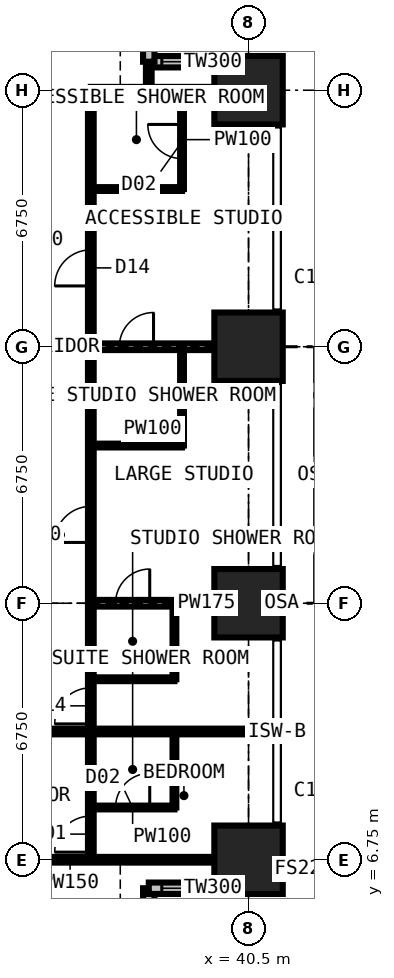
"""IFC4 building model, lengths in metres.
Left out: names, types, materials, properties, quantities, classifications, styles, units other than length and angle.
Written with IfcOpenShell. Run it as: python <this file> out.ifc"""

import sys

from ifc_helpers import new_model, si_unit, direction, frame, frame_2d, origin, origin_2d, place, context, subcontext, project, spatial, rectangle, extrude, element, fill, save


model = new_model("IFC4")
c1 = context("Model", 3, precision=1e-05, world=origin(), true_north=direction((0.0, 1.0)))
c2 = subcontext(c1, "Body", "Model", "MODEL_VIEW")
j1 = project(units=[si_unit("LENGTHUNIT", "METRE"), si_unit("PLANEANGLEUNIT", "RADIAN")], contexts=[c1])
p1 = place(None, origin())
s1 = spatial("IfcSite", under=j1, at=p1, CompositionType="ELEMENT")
p2 = place(p1, origin())
s2 = spatial("IfcBuilding", under=s1, at=p2, CompositionType="ELEMENT")
p3 = place(p2, frame((0.0, 0.0, 90.9)))
s3 = spatial("IfcBuildingStorey", under=s2, at=p3, CompositionType="ELEMENT", Elevation=90.9)
for number, where, z_axis, x_axis in (
    (1, (40.5, 6.75, 0.0), (0.0, 0.0, 1.0), (1.0, 0.0, 0.0)),
    (2, (40.5, 13.5, 0.0), (0.0, 0.0, 1.0), (1.0, 0.0, 0.0)),
    (3, (40.5, 20.25, 0.0), (0.0, 0.0, 1.0), (1.0, 0.0, 0.0)),
    (4, (40.5, 27.0, 0.0), (0.0, 0.0, 1.0), (1.0, 0.0, 0.0)),
):
    element("IfcColumn", number, at=place(p3, frame(where, z_axis=z_axis, x_axis=x_axis)), inside=s3, PredefinedType="COLUMN", context=c2, shape_type="SweptSolid", body=[
        extrude(rectangle(XDim=1.8, YDim=1.8, at=origin_2d()), origin(), (0.0, 0.0, 1.0), 3.6),
    ])
p4 = place(p3, frame((41.25, 27.75, 0.0), z_axis=(0.0, 0.0, 1.0), x_axis=(-1.0, 0.0, 0.0)))
e5 = element("IfcWall", 5, at=p4, inside=s3, PredefinedType="SOLIDWALL", context=c2, shape_type="SweptSolid", body=[
    extrude(rectangle(XDim=3.375, YDim=0.3, at=frame_2d((1.688, 0.0))), origin(), (0.0, 0.0, 1.0), 3.375),
])
p5 = place(p4, frame((1.833, 0.0, 0.9)))
e6 = element("IfcOpeningElement", 6, at=p5, cuts=e5, PredefinedType="OPENING", context=c2, shape_type="SweptSolid", body=[
    extrude(rectangle(XDim=1.2, YDim=1.8, at=frame_2d((0.6, 0.9))), frame((0.0, 0.16, 0.0), z_axis=(0.0, -1.0, 0.0), x_axis=(1.0, 0.0, 0.0)), (0.0, 0.0, 1.0), 0.32),
])
p6 = place(p3, frame((37.875, 27.75, 0.0), z_axis=(0.0, 0.0, 1.0), x_axis=(0.0, 1.0, 0.0)))
e7 = element("IfcWall", 7, at=p6, inside=s3, PredefinedType="SOLIDWALL", context=c2, shape_type="SweptSolid", body=[
    extrude(rectangle(XDim=3.375, YDim=0.3, at=frame_2d((1.688, 0.0))), origin(), (0.0, 0.0, 1.0), 3.375),
])
p7 = place(p6, frame((0.788, 0.0, 0.6)))
e8 = element("IfcOpeningElement", 8, at=p7, cuts=e7, PredefinedType="OPENING", context=c2, shape_type="SweptSolid", body=[
    extrude(rectangle(XDim=1.8, YDim=2.1, at=frame_2d((0.9, 1.05))), frame((0.0, 0.16, 0.0), z_axis=(0.0, -1.0, 0.0), x_axis=(1.0, 0.0, 0.0)), (0.0, 0.0, 1.0), 0.32),
])
p8 = place(p3, frame((37.875, 2.625, 0.0), z_axis=(0.0, 0.0, 1.0), x_axis=(0.0, 1.0, 0.0)))
e9 = element("IfcWall", 9, at=p8, inside=s3, PredefinedType="SOLIDWALL", context=c2, shape_type="SweptSolid", body=[
    extrude(rectangle(XDim=3.375, YDim=0.3, at=frame_2d((1.688, 0.0))), origin(), (0.0, 0.0, 1.0), 3.375),
])
p9 = place(p8, frame((0.788, 0.0, 0.6)))
e10 = element("IfcOpeningElement", 10, at=p9, cuts=e9, PredefinedType="OPENING", context=c2, shape_type="SweptSolid", body=[
    extrude(rectangle(XDim=1.8, YDim=2.1, at=frame_2d((0.9, 1.05))), frame((0.0, 0.16, 0.0), z_axis=(0.0, -1.0, 0.0), x_axis=(1.0, 0.0, 0.0)), (0.0, 0.0, 1.0), 0.32),
])
p10 = place(p3, frame((37.875, 6.0, 0.0), z_axis=(0.0, 0.0, 1.0), x_axis=(1.0, 0.0, 0.0)))
e11 = element("IfcWall", 11, at=p10, inside=s3, PredefinedType="SOLIDWALL", context=c2, shape_type="SweptSolid", body=[
    extrude(rectangle(XDim=3.375, YDim=0.3, at=frame_2d((1.688, 0.0))), origin(), (0.0, 0.0, 1.0), 3.375),
])
p11 = place(p10, frame((0.343, 0.0, 0.9)))
e12 = element("IfcOpeningElement", 12, at=p11, cuts=e11, PredefinedType="OPENING", context=c2, shape_type="SweptSolid", body=[
    extrude(rectangle(XDim=1.2, YDim=1.8, at=frame_2d((0.6, 0.9))), frame((0.0, 0.16, 0.0), z_axis=(0.0, -1.0, 0.0), x_axis=(1.0, 0.0, 0.0)), (0.0, 0.0, 1.0), 0.32),
])
p12 = place(p3, frame((30.375, 6.75, 0.0), z_axis=(0.0, 0.0, 1.0), x_axis=(1.0, 0.0, 0.0)))
e13 = element("IfcWall", 13, at=p12, inside=s3, PredefinedType="PARTITIONING", context=c2, shape_type="SweptSolid", body=[
    extrude(rectangle(XDim=10.859, YDim=0.15, at=frame_2d((5.429, 0.0))), origin(), (0.0, 0.0, 1.0), 2.877),
])
p13 = place(p12, frame((1.45, 0.0, 0.0)))
e14 = element("IfcOpeningElement", 14, at=p13, cuts=e13, PredefinedType="OPENING", context=c2, shape_type="SweptSolid", body=[
    extrude(rectangle(XDim=1.0, YDim=2.2, at=frame_2d((0.5, 1.1))), frame((0.0, 0.085, 0.0), z_axis=(0.0, -1.0, 0.0), x_axis=(1.0, 0.0, 0.0)), (0.0, 0.0, 1.0), 0.17),
])
p14 = place(p3, frame((30.375, 10.125, 0.0), z_axis=(0.0, 0.0, 1.0), x_axis=(1.0, 0.0, 0.0)))
e15 = element("IfcWall", 15, at=p14, inside=s3, PredefinedType="PARTITIONING", context=c2, shape_type="SweptSolid", body=[
    extrude(rectangle(XDim=10.859, YDim=0.15, at=frame_2d((5.429, 0.0))), origin(), (0.0, 0.0, 1.0), 3.375),
])
p15 = place(p14, frame((2.5, 0.0, 0.0)))
e16 = element("IfcOpeningElement", 16, at=p15, cuts=e15, PredefinedType="OPENING", context=c2, shape_type="SweptSolid", body=[
    extrude(rectangle(XDim=1.0, YDim=2.2, at=frame_2d((0.5, 1.1))), frame((0.0, 0.085, 0.0), z_axis=(0.0, -1.0, 0.0), x_axis=(1.0, 0.0, 0.0)), (0.0, 0.0, 1.0), 0.17),
])
p16 = place(p3, frame((36.35, 6.75, 0.0), z_axis=(0.0, 0.0, 1.0), x_axis=(0.0, 1.0, 0.0)))
e17 = element("IfcWall", 17, at=p16, inside=s3, PredefinedType="PARTITIONING", context=c2, shape_type="SweptSolid", body=[
    extrude(rectangle(XDim=20.25, YDim=0.15, at=frame_2d((10.125, 0.0))), origin(), (0.0, 0.0, 1.0), 3.375),
])
p17 = place(p16, frame((0.2, 0.0, 0.0)))
e18 = element("IfcOpeningElement", 18, at=p17, cuts=e17, PredefinedType="OPENING", context=c2, shape_type="SweptSolid", body=[
    extrude(rectangle(XDim=0.95, YDim=2.2, at=frame_2d((0.475, 1.1))), frame((0.0, 0.085, 0.0), z_axis=(0.0, -1.0, 0.0), x_axis=(1.0, 0.0, 0.0)), (0.0, 0.0, 1.0), 0.17),
])
p18 = place(p16, frame((15.1, 0.0, 0.0)))
e19 = element("IfcOpeningElement", 19, at=p18, cuts=e17, PredefinedType="OPENING", context=c2, shape_type="SweptSolid", body=[
    extrude(rectangle(XDim=0.95, YDim=2.2, at=frame_2d((0.475, 1.1))), frame((0.0, 0.085, 0.0), z_axis=(0.0, -1.0, 0.0), x_axis=(1.0, 0.0, 0.0)), (0.0, 0.0, 1.0), 0.17),
])
p19 = place(p16, frame((8.35, 0.0, 0.0)))
e20 = element("IfcOpeningElement", 20, at=p19, cuts=e17, PredefinedType="OPENING", context=c2, shape_type="SweptSolid", body=[
    extrude(rectangle(XDim=0.95, YDim=2.2, at=frame_2d((0.475, 1.1))), frame((0.0, 0.085, 0.0), z_axis=(0.0, -1.0, 0.0), x_axis=(1.0, 0.0, 0.0)), (0.0, 0.0, 1.0), 0.17),
])
p20 = place(p16, frame((3.575, 0.0, 0.0)))
e21 = element("IfcOpeningElement", 21, at=p20, cuts=e17, PredefinedType="OPENING", context=c2, shape_type="SweptSolid", body=[
    extrude(rectangle(XDim=0.95, YDim=2.2, at=frame_2d((0.475, 1.1))), frame((0.0, 0.085, 0.0), z_axis=(0.0, -1.0, 0.0), x_axis=(1.0, 0.0, 0.0)), (0.0, 0.0, 1.0), 0.17),
])
p21 = place(p3, frame((36.35, 8.125, 0.0), z_axis=(0.0, 0.0, 1.0), x_axis=(1.0, 0.0, 0.0)))
e22 = element("IfcWall", 22, at=p21, inside=s3, PredefinedType="PARTITIONING", context=c2, shape_type="SweptSolid", body=[
    extrude(rectangle(XDim=2.2, YDim=0.1, at=frame_2d((1.1, 0.0))), origin(), (0.0, 0.0, 1.0), 3.375),
])
p22 = place(p21, frame((0.65, 0.0, 0.0)))
e23 = element("IfcOpeningElement", 23, at=p22, cuts=e22, PredefinedType="OPENING", context=c2, shape_type="SweptSolid", body=[
    extrude(rectangle(XDim=0.9, YDim=2.2, at=frame_2d((0.45, 1.1))), frame((0.0, 0.06, 0.0), z_axis=(0.0, -1.0, 0.0), x_axis=(1.0, 0.0, 0.0)), (0.0, 0.0, 1.0), 0.12),
])
p23 = place(p3, frame((36.35, 11.5, 0.0), z_axis=(0.0, 0.0, 1.0), x_axis=(1.0, 0.0, 0.0)))
e24 = element("IfcWall", 24, at=p23, inside=s3, PredefinedType="PARTITIONING", context=c2, shape_type="SweptSolid", body=[
    extrude(rectangle(XDim=2.2, YDim=0.1, at=frame_2d((1.1, 0.0))), origin(), (0.0, 0.0, 1.0), 3.375),
])
p24 = place(p3, frame((36.35, 13.5, 0.0), z_axis=(0.0, 0.0, 1.0), x_axis=(1.0, 0.0, 0.0)))
e25 = element("IfcWall", 25, at=p24, inside=s3, PredefinedType="PARTITIONING", context=c2, shape_type="SweptSolid", body=[
    extrude(rectangle(XDim=4.884, YDim=0.175, at=frame_2d((2.442, 0.0))), origin(), (0.0, 0.0, 1.0), 2.61),
])
p25 = place(p24, frame((0.65, 0.0, 0.0)))
e26 = element("IfcOpeningElement", 26, at=p25, cuts=e25, PredefinedType="OPENING", context=c2, shape_type="SweptSolid", body=[
    extrude(rectangle(XDim=0.9, YDim=2.2, at=frame_2d((0.45, 1.1))), frame((0.0, 0.097, 0.0), z_axis=(0.0, -1.0, 0.0), x_axis=(1.0, 0.0, 0.0)), (0.0, 0.0, 1.0), 0.195),
])
p26 = place(p3, frame((36.35, 17.65, 0.0), z_axis=(0.0, 0.0, 1.0), x_axis=(1.0, 0.0, 0.0)))
e27 = element("IfcWall", 27, at=p26, inside=s3, PredefinedType="PARTITIONING", context=c2, shape_type="SweptSolid", body=[
    extrude(rectangle(XDim=2.4, YDim=0.1, at=frame_2d((1.2, 0.0))), origin(), (0.0, 0.0, 1.0), 3.375),
])
p27 = place(p3, frame((36.35, 20.25, 0.0), z_axis=(0.0, 0.0, 1.0), x_axis=(1.0, 0.0, 0.0)))
e28 = element("IfcWall", 28, at=p27, inside=s3, PredefinedType="PARTITIONING", context=c2, shape_type="SweptSolid", body=[
    extrude(rectangle(XDim=4.884, YDim=0.175, at=frame_2d((2.442, 0.0))), origin(), (0.0, 0.0, 1.0), 2.61),
])
p28 = place(p27, frame((0.75, 0.0, 0.0)))
e29 = element("IfcOpeningElement", 29, at=p28, cuts=e28, PredefinedType="OPENING", context=c2, shape_type="SweptSolid", body=[
    extrude(rectangle(XDim=0.9, YDim=2.2, at=frame_2d((0.45, 1.1))), frame((0.0, 0.097, 0.0), z_axis=(0.0, -1.0, 0.0), x_axis=(1.0, 0.0, 0.0)), (0.0, 0.0, 1.0), 0.195),
])
p29 = place(p3, frame((36.35, 24.4, 0.0), z_axis=(0.0, 0.0, 1.0), x_axis=(1.0, 0.0, 0.0)))
e30 = element("IfcWall", 30, at=p29, inside=s3, PredefinedType="PARTITIONING", context=c2, shape_type="SweptSolid", body=[
    extrude(rectangle(XDim=2.4, YDim=0.1, at=frame_2d((1.2, 0.0))), origin(), (0.0, 0.0, 1.0), 3.375),
])
p30 = place(p3, frame((36.35, 27.0, 0.0), z_axis=(0.0, 0.0, 1.0), x_axis=(1.0, 0.0, 0.0)))
e31 = element("IfcWall", 31, at=p30, inside=s3, PredefinedType="PARTITIONING", context=c2, shape_type="SweptSolid", body=[
    extrude(rectangle(XDim=4.884, YDim=0.175, at=frame_2d((2.442, 0.0))), origin(), (0.0, 0.0, 1.0), 2.877),
])
p31 = place(p3, frame((37.875, 27.0, 0.0), z_axis=(0.0, 0.0, 1.0), x_axis=(0.0, 1.0, 0.0)))
e32 = element("IfcWall", 32, at=p31, inside=s3, PredefinedType="PARTITIONING", context=c2, shape_type="SweptSolid", body=[
    extrude(rectangle(XDim=0.734, YDim=0.15, at=frame_2d((0.367, 0.0))), origin(), (0.0, 0.0, 1.0), 3.375),
])
for number, where, z_axis, x_axis in (
    (33, (38.55, 8.125, 0.0), (0.0, 0.0, 1.0), (0.0, 1.0, 0.0)),
    (34, (38.55, 11.5, 0.0), (0.0, 0.0, 1.0), (0.0, 1.0, 0.0)),
):
    element("IfcWall", number, at=place(p3, frame(where, z_axis=z_axis, x_axis=x_axis)), inside=s3, PredefinedType="PARTITIONING", context=c2, shape_type="SweptSolid", body=[
        extrude(rectangle(XDim=2.0, YDim=0.1, at=frame_2d((1.0, 0.0))), origin(), (0.0, 0.0, 1.0), 3.375),
    ])
p32 = place(p3, frame((38.75, 17.65, 0.0), z_axis=(0.0, 0.0, 1.0), x_axis=(0.0, 1.0, 0.0)))
e35 = element("IfcWall", 35, at=p32, inside=s3, PredefinedType="PARTITIONING", context=c2, shape_type="SweptSolid", body=[
    extrude(rectangle(XDim=2.6, YDim=0.1, at=frame_2d((1.3, 0.0))), origin(), (0.0, 0.0, 1.0), 3.375),
])
p33 = place(p3, frame((38.75, 24.4, 0.0), z_axis=(0.0, 0.0, 1.0), x_axis=(0.0, 1.0, 0.0)))
e36 = element("IfcWall", 36, at=p33, inside=s3, PredefinedType="PARTITIONING", context=c2, shape_type="SweptSolid", body=[
    extrude(rectangle(XDim=2.6, YDim=0.1, at=frame_2d((1.3, 0.0))), origin(), (0.0, 0.0, 1.0), 3.375),
])
p34 = place(p33, frame((0.8, 0.0, 0.0)))
e37 = element("IfcOpeningElement", 37, at=p34, cuts=e36, PredefinedType="OPENING", context=c2, shape_type="SweptSolid", body=[
    extrude(rectangle(XDim=0.9, YDim=2.2, at=frame_2d((0.45, 1.1))), frame((0.0, 0.06, 0.0), z_axis=(0.0, -1.0, 0.0), x_axis=(1.0, 0.0, 0.0)), (0.0, 0.0, 1.0), 0.12),
])
p35 = place(p5, origin())
e38 = element("IfcWindow", 38, at=p35, inside=s3, PartitioningType="SINGLE_PANEL", PredefinedType="WINDOW", context=c2, shape_type="SweptSolid", body=[
    extrude(rectangle(XDim=1.2, YDim=1.8, at=frame_2d((0.6, 0.9))), frame((0.0, 0.03, 0.0), z_axis=(0.0, -1.0, 0.0), x_axis=(1.0, 0.0, 0.0)), (0.0, 0.0, 1.0), 0.06),
])
fill(e6, e38)
p36 = place(p11, origin())
e39 = element("IfcWindow", 39, at=p36, inside=s3, PartitioningType="SINGLE_PANEL", PredefinedType="WINDOW", context=c2, shape_type="SweptSolid", body=[
    extrude(rectangle(XDim=1.2, YDim=1.8, at=frame_2d((0.6, 0.9))), frame((0.0, 0.03, 0.0), z_axis=(0.0, -1.0, 0.0), x_axis=(1.0, 0.0, 0.0)), (0.0, 0.0, 1.0), 0.06),
])
fill(e12, e39)
p37 = place(p17, origin())
e40 = element("IfcDoor", 40, at=p37, inside=s3, OperationType="SINGLE_SWING_LEFT", PredefinedType="DOOR", context=c2, shape_type="SweptSolid", body=[
    extrude(rectangle(XDim=0.95, YDim=2.2, at=frame_2d((0.475, 1.1))), frame((0.0, 0.025, 0.0), z_axis=(0.0, -1.0, 0.0), x_axis=(1.0, 0.0, 0.0)), (0.0, 0.0, 1.0), 0.05),
])
fill(e18, e40)
p38 = place(p22, origin())
e41 = element("IfcDoor", 41, at=p38, inside=s3, OperationType="SINGLE_SWING_RIGHT", PredefinedType="DOOR", context=c2, shape_type="SweptSolid", body=[
    extrude(rectangle(XDim=0.9, YDim=2.2, at=frame_2d((0.45, 1.1))), frame((0.0, 0.025, 0.0), z_axis=(0.0, -1.0, 0.0), x_axis=(1.0, 0.0, 0.0)), (0.0, 0.0, 1.0), 0.05),
])
fill(e23, e41)
p39 = place(p18, origin())
e42 = element("IfcDoor", 42, at=p39, inside=s3, OperationType="SINGLE_SWING_LEFT", PredefinedType="DOOR", context=c2, shape_type="SweptSolid", body=[
    extrude(rectangle(XDim=0.95, YDim=2.2, at=frame_2d((0.475, 1.1))), frame((0.0, 0.025, 0.0), z_axis=(0.0, -1.0, 0.0), x_axis=(1.0, 0.0, 0.0)), (0.0, 0.0, 1.0), 0.05),
])
fill(e19, e42)
p40 = place(p34, origin())
e43 = element("IfcDoor", 43, at=p40, inside=s3, OperationType="SINGLE_SWING_RIGHT", PredefinedType="DOOR", context=c2, shape_type="SweptSolid", body=[
    extrude(rectangle(XDim=0.9, YDim=2.2, at=frame_2d((0.45, 1.1))), frame((0.0, 0.025, 0.0), z_axis=(0.0, -1.0, 0.0), x_axis=(1.0, 0.0, 0.0)), (0.0, 0.0, 1.0), 0.05),
])
fill(e37, e43)
p41 = place(p19, origin())
e44 = element("IfcDoor", 44, at=p41, inside=s3, OperationType="SINGLE_SWING_LEFT", PredefinedType="DOOR", context=c2, shape_type="SweptSolid", body=[
    extrude(rectangle(XDim=0.95, YDim=2.2, at=frame_2d((0.475, 1.1))), frame((0.0, 0.025, 0.0), z_axis=(0.0, -1.0, 0.0), x_axis=(1.0, 0.0, 0.0)), (0.0, 0.0, 1.0), 0.05),
])
fill(e20, e44)
p42 = place(p28, origin())
e45 = element("IfcDoor", 45, at=p42, inside=s3, OperationType="SINGLE_SWING_RIGHT", PredefinedType="DOOR", context=c2, shape_type="SweptSolid", body=[
    extrude(rectangle(XDim=0.9, YDim=2.2, at=frame_2d((0.45, 1.1))), frame((0.0, 0.025, 0.0), z_axis=(0.0, -1.0, 0.0), x_axis=(1.0, 0.0, 0.0)), (0.0, 0.0, 1.0), 0.05),
])
fill(e29, e45)
p43 = place(p20, origin())
e46 = element("IfcDoor", 46, at=p43, inside=s3, OperationType="SINGLE_SWING_LEFT", PredefinedType="DOOR", context=c2, shape_type="SweptSolid", body=[
    extrude(rectangle(XDim=0.95, YDim=2.2, at=frame_2d((0.475, 1.1))), frame((0.0, 0.025, 0.0), z_axis=(0.0, -1.0, 0.0), x_axis=(1.0, 0.0, 0.0)), (0.0, 0.0, 1.0), 0.05),
])
fill(e21, e46)
p44 = place(p25, origin())
e47 = element("IfcDoor", 47, at=p44, inside=s3, OperationType="SINGLE_SWING_RIGHT", PredefinedType="DOOR", context=c2, shape_type="SweptSolid", body=[
    extrude(rectangle(XDim=0.9, YDim=2.2, at=frame_2d((0.45, 1.1))), frame((0.0, 0.025, 0.0), z_axis=(0.0, -1.0, 0.0), x_axis=(1.0, 0.0, 0.0)), (0.0, 0.0, 1.0), 0.05),
])
fill(e26, e47)
save(model, sys.argv[1])
